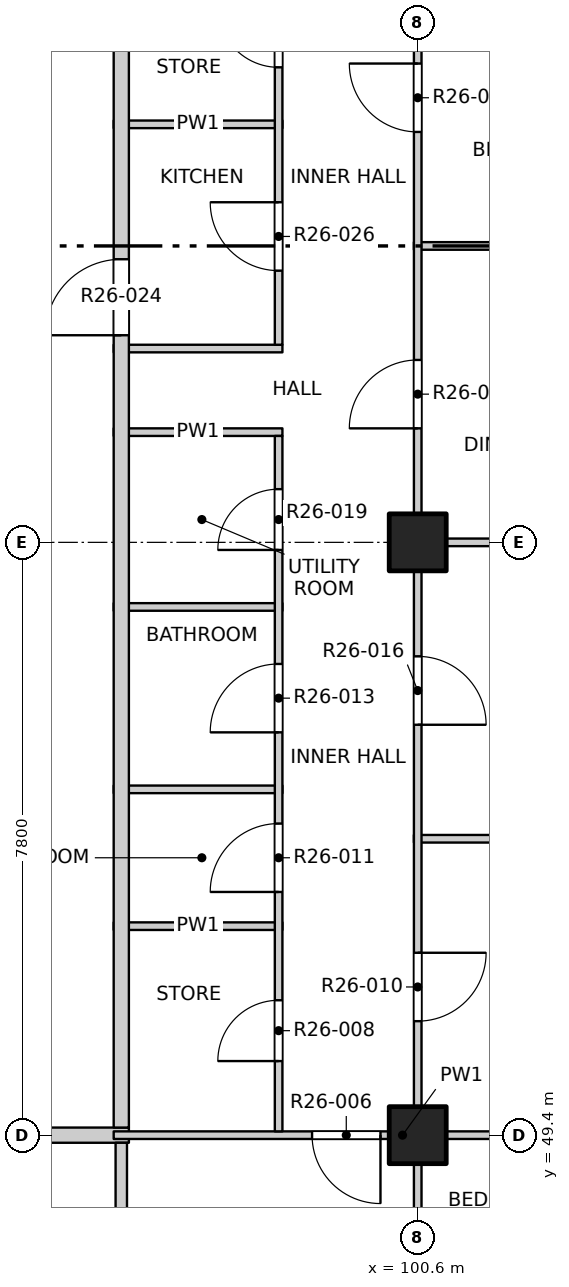
"""IFC4 building model, lengths in metres.
Left out: names, types, materials, properties, quantities, classifications, styles, units other than length and angle.
Written with IfcOpenShell. Run it as: python <this file> out.ifc"""

import sys

from ifc_helpers import new_model, si_unit, direction, frame, frame_2d, origin, origin_2d, place, context, subcontext, project, spatial, rectangle, extrude, element, fill, save


model = new_model("IFC4")
c1 = context("Model", 3, precision=1e-05, world=origin(), true_north=direction((0.0, 1.0)))
c2 = subcontext(c1, "Body", "Model", "MODEL_VIEW")
j1 = project(units=[si_unit("LENGTHUNIT", "METRE"), si_unit("PLANEANGLEUNIT", "RADIAN")], contexts=[c1])
p1 = place(None, origin())
s1 = spatial("IfcSite", under=j1, at=p1, CompositionType="ELEMENT")
p2 = place(p1, origin())
s2 = spatial("IfcBuilding", under=s1, at=p2, CompositionType="ELEMENT")
p3 = place(p2, frame((0.0, 0.0, 259.6)))
s3 = spatial("IfcBuildingStorey", under=s2, at=p3, CompositionType="ELEMENT", Elevation=259.6)
for number, where, z_axis, x_axis in (
    (1, (100.6, 49.4, -0.25), (0.0, 0.0, 1.0), (1.0, 0.0, 0.0)),
    (2, (100.6, 57.2, -0.25), (0.0, 0.0, 1.0), (1.0, 0.0, 0.0)),
):
    element("IfcColumn", number, at=place(p3, frame(where, z_axis=z_axis, x_axis=x_axis)), inside=s3, PredefinedType="COLUMN", context=c2, shape_type="SweptSolid", body=[
        extrude(rectangle(XDim=0.75, YDim=0.75, at=origin_2d()), origin(), (0.0, 0.0, 1.0), 3.4),
    ])
p4 = place(p3, frame((73.2, 49.4, 0.0), z_axis=(0.0, 0.0, 1.0), x_axis=(1.0, 0.0, 0.0)))
e3 = element("IfcWall", 3, at=p4, inside=s3, PredefinedType="PARTITIONING", context=c2, shape_type="SweptSolid", body=[
    extrude(rectangle(XDim=23.6, YDim=0.2, at=frame_2d((11.8, 0.0))), origin(), (0.0, 0.0, 1.0), 3.15),
])
p5 = place(p4, frame((2.325, 0.0, 0.0)))
e4 = element("IfcOpeningElement", 4, at=p5, cuts=e3, PredefinedType="OPENING", context=c2, shape_type="SweptSolid", body=[
    extrude(rectangle(XDim=1.2, YDim=2.1, at=frame_2d((0.6, 1.05))), frame((0.0, 0.11, 0.0), z_axis=(0.0, -1.0, 0.0), x_axis=(1.0, 0.0, 0.0)), (0.0, 0.0, 1.0), 0.22),
])
p6 = place(p4, frame((15.1, 0.0, 0.0)))
e5 = element("IfcOpeningElement", 5, at=p6, cuts=e3, PredefinedType="OPENING", context=c2, shape_type="SweptSolid", body=[
    extrude(rectangle(XDim=1.2, YDim=2.1, at=frame_2d((0.6, 1.05))), frame((0.0, 0.11, 0.0), z_axis=(0.0, -1.0, 0.0), x_axis=(1.0, 0.0, 0.0)), (0.0, 0.0, 1.0), 0.22),
])
p7 = place(p3, frame((96.6, 49.4, 0.0), z_axis=(0.0, 0.0, 1.0), x_axis=(1.0, 0.0, 0.0)))
e6 = element("IfcWall", 6, at=p7, inside=s3, PredefinedType="PARTITIONING", context=c2, shape_type="SweptSolid", body=[
    extrude(rectangle(XDim=7.6, YDim=0.1, at=frame_2d((3.8, 0.0))), origin(), (0.0, 0.0, 1.0), 3.15),
])
p8 = place(p7, frame((2.61, 0.0, 0.0)))
e7 = element("IfcOpeningElement", 7, at=p8, cuts=e6, PredefinedType="OPENING", context=c2, shape_type="SweptSolid", body=[
    extrude(rectangle(XDim=0.9, YDim=2.1, at=frame_2d((0.45, 1.05))), frame((0.0, 0.06, 0.0), z_axis=(0.0, -1.0, 0.0), x_axis=(1.0, 0.0, 0.0)), (0.0, 0.0, 1.0), 0.12),
])
p9 = place(p3, frame((96.6, 52.15, 0.0), z_axis=(0.0, 0.0, 1.0), x_axis=(1.0, 0.0, 0.0)))
e8 = element("IfcWall", 8, at=p9, inside=s3, PredefinedType="PARTITIONING", context=c2, shape_type="SweptSolid", body=[
    extrude(rectangle(XDim=2.22, YDim=0.1, at=frame_2d((1.11, 0.0))), origin(), (0.0, 0.0, 1.0), 3.15),
])
p10 = place(p3, frame((100.55, 53.3, 0.0), z_axis=(0.0, 0.0, 1.0), x_axis=(1.0, 0.0, 0.0)))
e9 = element("IfcWall", 9, at=p10, inside=s3, PredefinedType="PARTITIONING", context=c2, shape_type="SweptSolid", body=[
    extrude(rectangle(XDim=3.65, YDim=0.1, at=frame_2d((1.825, 0.0))), origin(), (0.0, 0.0, 1.0), 3.15),
])
for number, where, z_axis, x_axis in (
    (10, (96.6, 53.95, 0.0), (0.0, 0.0, 1.0), (1.0, 0.0, 0.0)),
    (11, (96.6, 56.35, 0.0), (0.0, 0.0, 1.0), (1.0, 0.0, 0.0)),
):
    element("IfcWall", number, at=place(p3, frame(where, z_axis=z_axis, x_axis=x_axis)), inside=s3, PredefinedType="PARTITIONING", context=c2, shape_type="SweptSolid", body=[
        extrude(rectangle(XDim=2.22, YDim=0.1, at=frame_2d((1.11, 0.0))), origin(), (0.0, 0.0, 1.0), 3.15),
    ])
p11 = place(p3, frame((100.55, 57.2, 0.0), z_axis=(0.0, 0.0, 1.0), x_axis=(1.0, 0.0, 0.0)))
e12 = element("IfcWall", 12, at=p11, inside=s3, PredefinedType="PARTITIONING", context=c2, shape_type="SweptSolid", body=[
    extrude(rectangle(XDim=3.65, YDim=0.1, at=frame_2d((1.825, 0.0))), origin(), (0.0, 0.0, 1.0), 3.15),
])
for number, where, z_axis, x_axis in (
    (13, (96.6, 58.65, 0.0), (0.0, 0.0, 1.0), (1.0, 0.0, 0.0)),
    (14, (96.6, 59.75, 0.0), (0.0, 0.0, 1.0), (1.0, 0.0, 0.0)),
):
    element("IfcWall", number, at=place(p3, frame(where, z_axis=z_axis, x_axis=x_axis)), inside=s3, PredefinedType="PARTITIONING", context=c2, shape_type="SweptSolid", body=[
        extrude(rectangle(XDim=2.22, YDim=0.1, at=frame_2d((1.11, 0.0))), origin(), (0.0, 0.0, 1.0), 3.15),
    ])
p12 = place(p3, frame((100.55, 61.1, 0.0), z_axis=(0.0, 0.0, 1.0), x_axis=(1.0, 0.0, 0.0)))
e15 = element("IfcWall", 15, at=p12, inside=s3, PredefinedType="PARTITIONING", context=c2, shape_type="SweptSolid", body=[
    extrude(rectangle(XDim=3.65, YDim=0.1, at=frame_2d((1.825, 0.0))), origin(), (0.0, 0.0, 1.0), 3.15),
])
p13 = place(p3, frame((96.6, 62.7, 0.0), z_axis=(0.0, 0.0, 1.0), x_axis=(1.0, 0.0, 0.0)))
e16 = element("IfcWall", 16, at=p13, inside=s3, PredefinedType="PARTITIONING", context=c2, shape_type="SweptSolid", body=[
    extrude(rectangle(XDim=2.22, YDim=0.1, at=frame_2d((1.11, 0.0))), origin(), (0.0, 0.0, 1.0), 3.15),
])
p14 = place(p3, frame((96.7, 45.8, 0.0), z_axis=(0.0, 0.0, 1.0), x_axis=(0.0, 1.0, 0.0)))
e17 = element("IfcWall", 17, at=p14, inside=s3, PredefinedType="PARTITIONING", context=c2, shape_type="SweptSolid", body=[
    extrude(rectangle(XDim=3.5, YDim=0.15, at=frame_2d((1.75, 0.0))), origin(), (0.0, 0.0, 1.0), 3.15),
])
p15 = place(p3, frame((96.7, 49.5, 0.0), z_axis=(0.0, 0.0, 1.0), x_axis=(0.0, 1.0, 0.0)))
e18 = element("IfcWall", 18, at=p15, inside=s3, PredefinedType="PARTITIONING", context=c2, shape_type="SweptSolid", body=[
    extrude(rectangle(XDim=34.7, YDim=0.2, at=frame_2d((17.35, 0.0))), origin(), (0.0, 0.0, 1.0), 3.15),
])
p16 = place(p15, frame((10.425, 0.0, 0.0)))
e19 = element("IfcOpeningElement", 19, at=p16, cuts=e18, PredefinedType="OPENING", context=c2, shape_type="SweptSolid", body=[
    extrude(rectangle(XDim=1.0, YDim=2.1, at=frame_2d((0.5, 1.05))), frame((0.0, 0.11, 0.0), z_axis=(0.0, -1.0, 0.0), x_axis=(1.0, 0.0, 0.0)), (0.0, 0.0, 1.0), 0.22),
])
p17 = place(p15, frame((29.225, 0.0, 0.0)))
e20 = element("IfcOpeningElement", 20, at=p17, cuts=e18, PredefinedType="OPENING", context=c2, shape_type="SweptSolid", body=[
    extrude(rectangle(XDim=1.0, YDim=2.1, at=frame_2d((0.5, 1.05))), frame((0.0, 0.11, 0.0), z_axis=(0.0, -1.0, 0.0), x_axis=(1.0, 0.0, 0.0)), (0.0, 0.0, 1.0), 0.22),
])
p18 = place(p3, frame((98.77, 49.45, 0.0), z_axis=(0.0, 0.0, 1.0), x_axis=(0.0, 1.0, 0.0)))
e21 = element("IfcWall", 21, at=p18, inside=s3, PredefinedType="PARTITIONING", context=c2, shape_type="SweptSolid", body=[
    extrude(rectangle(XDim=9.15, YDim=0.1, at=frame_2d((4.575, 0.0))), origin(), (0.0, 0.0, 1.0), 3.15),
])
p19 = place(p18, frame((0.925, 0.0, 0.0)))
e22 = element("IfcOpeningElement", 22, at=p19, cuts=e21, PredefinedType="OPENING", context=c2, shape_type="SweptSolid", body=[
    extrude(rectangle(XDim=0.8, YDim=2.1, at=frame_2d((0.4, 1.05))), frame((0.0, 0.06, 0.0), z_axis=(0.0, -1.0, 0.0), x_axis=(1.0, 0.0, 0.0)), (0.0, 0.0, 1.0), 0.12),
])
p20 = place(p18, frame((3.15, 0.0, 0.0)))
e23 = element("IfcOpeningElement", 23, at=p20, cuts=e21, PredefinedType="OPENING", context=c2, shape_type="SweptSolid", body=[
    extrude(rectangle(XDim=0.9, YDim=2.1, at=frame_2d((0.45, 1.05))), frame((0.0, 0.06, 0.0), z_axis=(0.0, -1.0, 0.0), x_axis=(1.0, 0.0, 0.0)), (0.0, 0.0, 1.0), 0.12),
])
p21 = place(p18, frame((5.25, 0.0, 0.0)))
e24 = element("IfcOpeningElement", 24, at=p21, cuts=e21, PredefinedType="OPENING", context=c2, shape_type="SweptSolid", body=[
    extrude(rectangle(XDim=0.9, YDim=2.1, at=frame_2d((0.45, 1.05))), frame((0.0, 0.06, 0.0), z_axis=(0.0, -1.0, 0.0), x_axis=(1.0, 0.0, 0.0)), (0.0, 0.0, 1.0), 0.12),
])
p22 = place(p18, frame((7.65, 0.0, 0.0)))
e25 = element("IfcOpeningElement", 25, at=p22, cuts=e21, PredefinedType="OPENING", context=c2, shape_type="SweptSolid", body=[
    extrude(rectangle(XDim=0.8, YDim=2.1, at=frame_2d((0.4, 1.05))), frame((0.0, 0.06, 0.0), z_axis=(0.0, -1.0, 0.0), x_axis=(1.0, 0.0, 0.0)), (0.0, 0.0, 1.0), 0.12),
])
p23 = place(p3, frame((98.77, 59.8, 0.0), z_axis=(0.0, 0.0, 1.0), x_axis=(0.0, 1.0, 0.0)))
e26 = element("IfcWall", 26, at=p23, inside=s3, PredefinedType="PARTITIONING", context=c2, shape_type="SweptSolid", body=[
    extrude(rectangle(XDim=17.6, YDim=0.1, at=frame_2d((8.8, 0.0))), origin(), (0.0, 0.0, 1.0), 3.15),
])
p24 = place(p23, frame((0.975, 0.0, 0.0)))
e27 = element("IfcOpeningElement", 27, at=p24, cuts=e26, PredefinedType="OPENING", context=c2, shape_type="SweptSolid", body=[
    extrude(rectangle(XDim=0.9, YDim=2.1, at=frame_2d((0.45, 1.05))), frame((0.0, 0.06, 0.0), z_axis=(0.0, -1.0, 0.0), x_axis=(1.0, 0.0, 0.0)), (0.0, 0.0, 1.0), 0.12),
])
p25 = place(p23, frame((3.65, 0.0, 0.0)))
e28 = element("IfcOpeningElement", 28, at=p25, cuts=e26, PredefinedType="OPENING", context=c2, shape_type="SweptSolid", body=[
    extrude(rectangle(XDim=0.8, YDim=2.1, at=frame_2d((0.4, 1.05))), frame((0.0, 0.06, 0.0), z_axis=(0.0, -1.0, 0.0), x_axis=(1.0, 0.0, 0.0)), (0.0, 0.0, 1.0), 0.12),
])
p26 = place(p23, frame((6.025, 0.0, 0.0)))
e29 = element("IfcOpeningElement", 29, at=p26, cuts=e26, PredefinedType="OPENING", context=c2, shape_type="SweptSolid", body=[
    extrude(rectangle(XDim=0.8, YDim=2.1, at=frame_2d((0.4, 1.05))), frame((0.0, 0.06, 0.0), z_axis=(0.0, -1.0, 0.0), x_axis=(1.0, 0.0, 0.0)), (0.0, 0.0, 1.0), 0.12),
])
p27 = place(p23, frame((8.1, 0.0, 0.0)))
e30 = element("IfcOpeningElement", 30, at=p27, cuts=e26, PredefinedType="OPENING", context=c2, shape_type="SweptSolid", body=[
    extrude(rectangle(XDim=0.9, YDim=2.1, at=frame_2d((0.45, 1.05))), frame((0.0, 0.06, 0.0), z_axis=(0.0, -1.0, 0.0), x_axis=(1.0, 0.0, 0.0)), (0.0, 0.0, 1.0), 0.12),
])
p28 = place(p23, frame((10.265, 0.0, 0.0)))
e31 = element("IfcOpeningElement", 31, at=p28, cuts=e26, PredefinedType="OPENING", context=c2, shape_type="SweptSolid", body=[
    extrude(rectangle(XDim=0.9, YDim=2.1, at=frame_2d((0.45, 1.05))), frame((0.0, 0.06, 0.0), z_axis=(0.0, -1.0, 0.0), x_axis=(1.0, 0.0, 0.0)), (0.0, 0.0, 1.0), 0.12),
])
p29 = place(p23, frame((12.805, 0.0, 0.0)))
e32 = element("IfcOpeningElement", 32, at=p29, cuts=e26, PredefinedType="OPENING", context=c2, shape_type="SweptSolid", body=[
    extrude(rectangle(XDim=0.8, YDim=2.1, at=frame_2d((0.4, 1.05))), frame((0.0, 0.06, 0.0), z_axis=(0.0, -1.0, 0.0), x_axis=(1.0, 0.0, 0.0)), (0.0, 0.0, 1.0), 0.12),
])
p30 = place(p23, frame((15.59, 0.0, 0.0)))
e33 = element("IfcOpeningElement", 33, at=p30, cuts=e26, PredefinedType="OPENING", context=c2, shape_type="SweptSolid", body=[
    extrude(rectangle(XDim=0.9, YDim=2.1, at=frame_2d((0.45, 1.05))), frame((0.0, 0.06, 0.0), z_axis=(0.0, -1.0, 0.0), x_axis=(1.0, 0.0, 0.0)), (0.0, 0.0, 1.0), 0.12),
])
p31 = place(p3, frame((100.6, 45.8, 0.0), z_axis=(0.0, 0.0, 1.0), x_axis=(0.0, 1.0, 0.0)))
e34 = element("IfcWall", 34, at=p31, inside=s3, PredefinedType="PARTITIONING", context=c2, shape_type="SweptSolid", body=[
    extrude(rectangle(XDim=38.4, YDim=0.1, at=frame_2d((19.2, 0.0))), origin(), (0.0, 0.0, 1.0), 3.15),
])
p32 = place(p31, frame((1.05, 0.0, 0.0)))
e35 = element("IfcOpeningElement", 35, at=p32, cuts=e34, PredefinedType="OPENING", context=c2, shape_type="SweptSolid", body=[
    extrude(rectangle(XDim=1.2, YDim=2.1, at=frame_2d((0.6, 1.05))), frame((0.0, 0.06, 0.0), z_axis=(0.0, -1.0, 0.0), x_axis=(1.0, 0.0, 0.0)), (0.0, 0.0, 1.0), 0.12),
])
p33 = place(p31, frame((5.1, 0.0, 0.0)))
e36 = element("IfcOpeningElement", 36, at=p33, cuts=e34, PredefinedType="OPENING", context=c2, shape_type="SweptSolid", body=[
    extrude(rectangle(XDim=0.9, YDim=2.1, at=frame_2d((0.45, 1.05))), frame((0.0, 0.06, 0.0), z_axis=(0.0, -1.0, 0.0), x_axis=(1.0, 0.0, 0.0)), (0.0, 0.0, 1.0), 0.12),
])
p34 = place(p31, frame((9.0, 0.0, 0.0)))
e37 = element("IfcOpeningElement", 37, at=p34, cuts=e34, PredefinedType="OPENING", context=c2, shape_type="SweptSolid", body=[
    extrude(rectangle(XDim=0.9, YDim=2.1, at=frame_2d((0.45, 1.05))), frame((0.0, 0.06, 0.0), z_axis=(0.0, -1.0, 0.0), x_axis=(1.0, 0.0, 0.0)), (0.0, 0.0, 1.0), 0.12),
])
p35 = place(p31, frame((12.9, 0.0, 0.0)))
e38 = element("IfcOpeningElement", 38, at=p35, cuts=e34, PredefinedType="OPENING", context=c2, shape_type="SweptSolid", body=[
    extrude(rectangle(XDim=0.9, YDim=2.1, at=frame_2d((0.45, 1.05))), frame((0.0, 0.06, 0.0), z_axis=(0.0, -1.0, 0.0), x_axis=(1.0, 0.0, 0.0)), (0.0, 0.0, 1.0), 0.12),
])
p36 = place(p31, frame((16.8, 0.0, 0.0)))
e39 = element("IfcOpeningElement", 39, at=p36, cuts=e34, PredefinedType="OPENING", context=c2, shape_type="SweptSolid", body=[
    extrude(rectangle(XDim=0.9, YDim=2.1, at=frame_2d((0.45, 1.05))), frame((0.0, 0.06, 0.0), z_axis=(0.0, -1.0, 0.0), x_axis=(1.0, 0.0, 0.0)), (0.0, 0.0, 1.0), 0.12),
])
p37 = place(p31, frame((20.7, 0.0, 0.0)))
e40 = element("IfcOpeningElement", 40, at=p37, cuts=e34, PredefinedType="OPENING", context=c2, shape_type="SweptSolid", body=[
    extrude(rectangle(XDim=0.9, YDim=2.1, at=frame_2d((0.45, 1.05))), frame((0.0, 0.06, 0.0), z_axis=(0.0, -1.0, 0.0), x_axis=(1.0, 0.0, 0.0)), (0.0, 0.0, 1.0), 0.12),
])
p38 = place(p31, frame((24.6, 0.0, 0.0)))
e41 = element("IfcOpeningElement", 41, at=p38, cuts=e34, PredefinedType="OPENING", context=c2, shape_type="SweptSolid", body=[
    extrude(rectangle(XDim=0.9, YDim=2.1, at=frame_2d((0.45, 1.05))), frame((0.0, 0.06, 0.0), z_axis=(0.0, -1.0, 0.0), x_axis=(1.0, 0.0, 0.0)), (0.0, 0.0, 1.0), 0.12),
])
p39 = place(p31, frame((28.5, 0.0, 0.0)))
e42 = element("IfcOpeningElement", 42, at=p39, cuts=e34, PredefinedType="OPENING", context=c2, shape_type="SweptSolid", body=[
    extrude(rectangle(XDim=0.9, YDim=2.1, at=frame_2d((0.45, 1.05))), frame((0.0, 0.06, 0.0), z_axis=(0.0, -1.0, 0.0), x_axis=(1.0, 0.0, 0.0)), (0.0, 0.0, 1.0), 0.12),
])
p40 = place(p31, frame((32.4, 0.0, 0.0)))
e43 = element("IfcOpeningElement", 43, at=p40, cuts=e34, PredefinedType="OPENING", context=c2, shape_type="SweptSolid", body=[
    extrude(rectangle(XDim=0.9, YDim=2.1, at=frame_2d((0.45, 1.05))), frame((0.0, 0.06, 0.0), z_axis=(0.0, -1.0, 0.0), x_axis=(1.0, 0.0, 0.0)), (0.0, 0.0, 1.0), 0.12),
])
p41 = place(p31, frame((36.15, 0.0, 0.0)))
e44 = element("IfcOpeningElement", 44, at=p41, cuts=e34, PredefinedType="OPENING", context=c2, shape_type="SweptSolid", body=[
    extrude(rectangle(XDim=1.2, YDim=2.1, at=frame_2d((0.6, 1.05))), frame((0.0, 0.06, 0.0), z_axis=(0.0, -1.0, 0.0), x_axis=(1.0, 0.0, 0.0)), (0.0, 0.0, 1.0), 0.12),
])
p42 = place(p8, origin())
e45 = element("IfcDoor", 45, at=p42, inside=s3, OperationType="SINGLE_SWING_LEFT", PredefinedType="DOOR", context=c2, shape_type="SweptSolid", body=[
    extrude(rectangle(XDim=0.9, YDim=2.1, at=frame_2d((0.45, 1.05))), frame((0.0, 0.025, 0.0), z_axis=(0.0, -1.0, 0.0), x_axis=(1.0, 0.0, 0.0)), (0.0, 0.0, 1.0), 0.05),
])
fill(e7, e45)
p43 = place(p19, origin())
e46 = element("IfcDoor", 46, at=p43, inside=s3, OperationType="SINGLE_SWING_LEFT", PredefinedType="DOOR", context=c2, shape_type="SweptSolid", body=[
    extrude(rectangle(XDim=0.8, YDim=2.1, at=frame_2d((0.4, 1.05))), frame((0.0, 0.025, 0.0), z_axis=(0.0, -1.0, 0.0), x_axis=(1.0, 0.0, 0.0)), (0.0, 0.0, 1.0), 0.05),
])
fill(e22, e46)
p44 = place(p33, origin())
e47 = element("IfcDoor", 47, at=p44, inside=s3, OperationType="SINGLE_SWING_LEFT", PredefinedType="DOOR", context=c2, shape_type="SweptSolid", body=[
    extrude(rectangle(XDim=0.9, YDim=2.1, at=frame_2d((0.45, 1.05))), frame((0.0, 0.025, 0.0), z_axis=(0.0, -1.0, 0.0), x_axis=(1.0, 0.0, 0.0)), (0.0, 0.0, 1.0), 0.05),
])
fill(e36, e47)
p45 = place(p20, origin())
e48 = element("IfcDoor", 48, at=p45, inside=s3, OperationType="SINGLE_SWING_LEFT", PredefinedType="DOOR", context=c2, shape_type="SweptSolid", body=[
    extrude(rectangle(XDim=0.9, YDim=2.1, at=frame_2d((0.45, 1.05))), frame((0.0, 0.025, 0.0), z_axis=(0.0, -1.0, 0.0), x_axis=(1.0, 0.0, 0.0)), (0.0, 0.0, 1.0), 0.05),
])
fill(e23, e48)
p46 = place(p21, origin())
e49 = element("IfcDoor", 49, at=p46, inside=s3, OperationType="SINGLE_SWING_LEFT", PredefinedType="DOOR", context=c2, shape_type="SweptSolid", body=[
    extrude(rectangle(XDim=0.9, YDim=2.1, at=frame_2d((0.45, 1.05))), frame((0.0, 0.025, 0.0), z_axis=(0.0, -1.0, 0.0), x_axis=(1.0, 0.0, 0.0)), (0.0, 0.0, 1.0), 0.05),
])
fill(e24, e49)
p47 = place(p34, origin())
e50 = element("IfcDoor", 50, at=p47, inside=s3, OperationType="SINGLE_SWING_RIGHT", PredefinedType="DOOR", context=c2, shape_type="SweptSolid", body=[
    extrude(rectangle(XDim=0.9, YDim=2.1, at=frame_2d((0.45, 1.05))), frame((0.0, 0.025, 0.0), z_axis=(0.0, -1.0, 0.0), x_axis=(1.0, 0.0, 0.0)), (0.0, 0.0, 1.0), 0.05),
])
fill(e37, e50)
p48 = place(p22, origin())
e51 = element("IfcDoor", 51, at=p48, inside=s3, OperationType="SINGLE_SWING_LEFT", PredefinedType="DOOR", context=c2, shape_type="SweptSolid", body=[
    extrude(rectangle(XDim=0.8, YDim=2.1, at=frame_2d((0.4, 1.05))), frame((0.0, 0.025, 0.0), z_axis=(0.0, -1.0, 0.0), x_axis=(1.0, 0.0, 0.0)), (0.0, 0.0, 1.0), 0.05),
])
fill(e25, e51)
p49 = place(p35, origin())
e52 = element("IfcDoor", 52, at=p49, inside=s3, OperationType="SINGLE_SWING_LEFT", PredefinedType="DOOR", context=c2, shape_type="SweptSolid", body=[
    extrude(rectangle(XDim=0.9, YDim=2.1, at=frame_2d((0.45, 1.05))), frame((0.0, 0.025, 0.0), z_axis=(0.0, -1.0, 0.0), x_axis=(1.0, 0.0, 0.0)), (0.0, 0.0, 1.0), 0.05),
])
fill(e38, e52)
p50 = place(p16, origin())
e53 = element("IfcDoor", 53, at=p50, inside=s3, OperationType="SINGLE_SWING_LEFT", PredefinedType="DOOR", context=c2, shape_type="SweptSolid", body=[
    extrude(rectangle(XDim=1.0, YDim=2.1, at=frame_2d((0.5, 1.05))), frame((0.0, 0.025, 0.0), z_axis=(0.0, -1.0, 0.0), x_axis=(1.0, 0.0, 0.0)), (0.0, 0.0, 1.0), 0.05),
])
fill(e19, e53)
p51 = place(p24, origin())
e54 = element("IfcDoor", 54, at=p51, inside=s3, OperationType="SINGLE_SWING_RIGHT", PredefinedType="DOOR", context=c2, shape_type="SweptSolid", body=[
    extrude(rectangle(XDim=0.9, YDim=2.1, at=frame_2d((0.45, 1.05))), frame((0.0, 0.025, 0.0), z_axis=(0.0, -1.0, 0.0), x_axis=(1.0, 0.0, 0.0)), (0.0, 0.0, 1.0), 0.05),
])
fill(e27, e54)
p52 = place(p36, origin())
e55 = element("IfcDoor", 55, at=p52, inside=s3, OperationType="SINGLE_SWING_RIGHT", PredefinedType="DOOR", context=c2, shape_type="SweptSolid", body=[
    extrude(rectangle(XDim=0.9, YDim=2.1, at=frame_2d((0.45, 1.05))), frame((0.0, 0.025, 0.0), z_axis=(0.0, -1.0, 0.0), x_axis=(1.0, 0.0, 0.0)), (0.0, 0.0, 1.0), 0.05),
])
fill(e39, e55)
p53 = place(p25, origin())
e56 = element("IfcDoor", 56, at=p53, inside=s3, OperationType="SINGLE_SWING_RIGHT", PredefinedType="DOOR", context=c2, shape_type="SweptSolid", body=[
    extrude(rectangle(XDim=0.8, YDim=2.1, at=frame_2d((0.4, 1.05))), frame((0.0, 0.025, 0.0), z_axis=(0.0, -1.0, 0.0), x_axis=(1.0, 0.0, 0.0)), (0.0, 0.0, 1.0), 0.05),
])
fill(e28, e56)
save(model, sys.argv[1])
